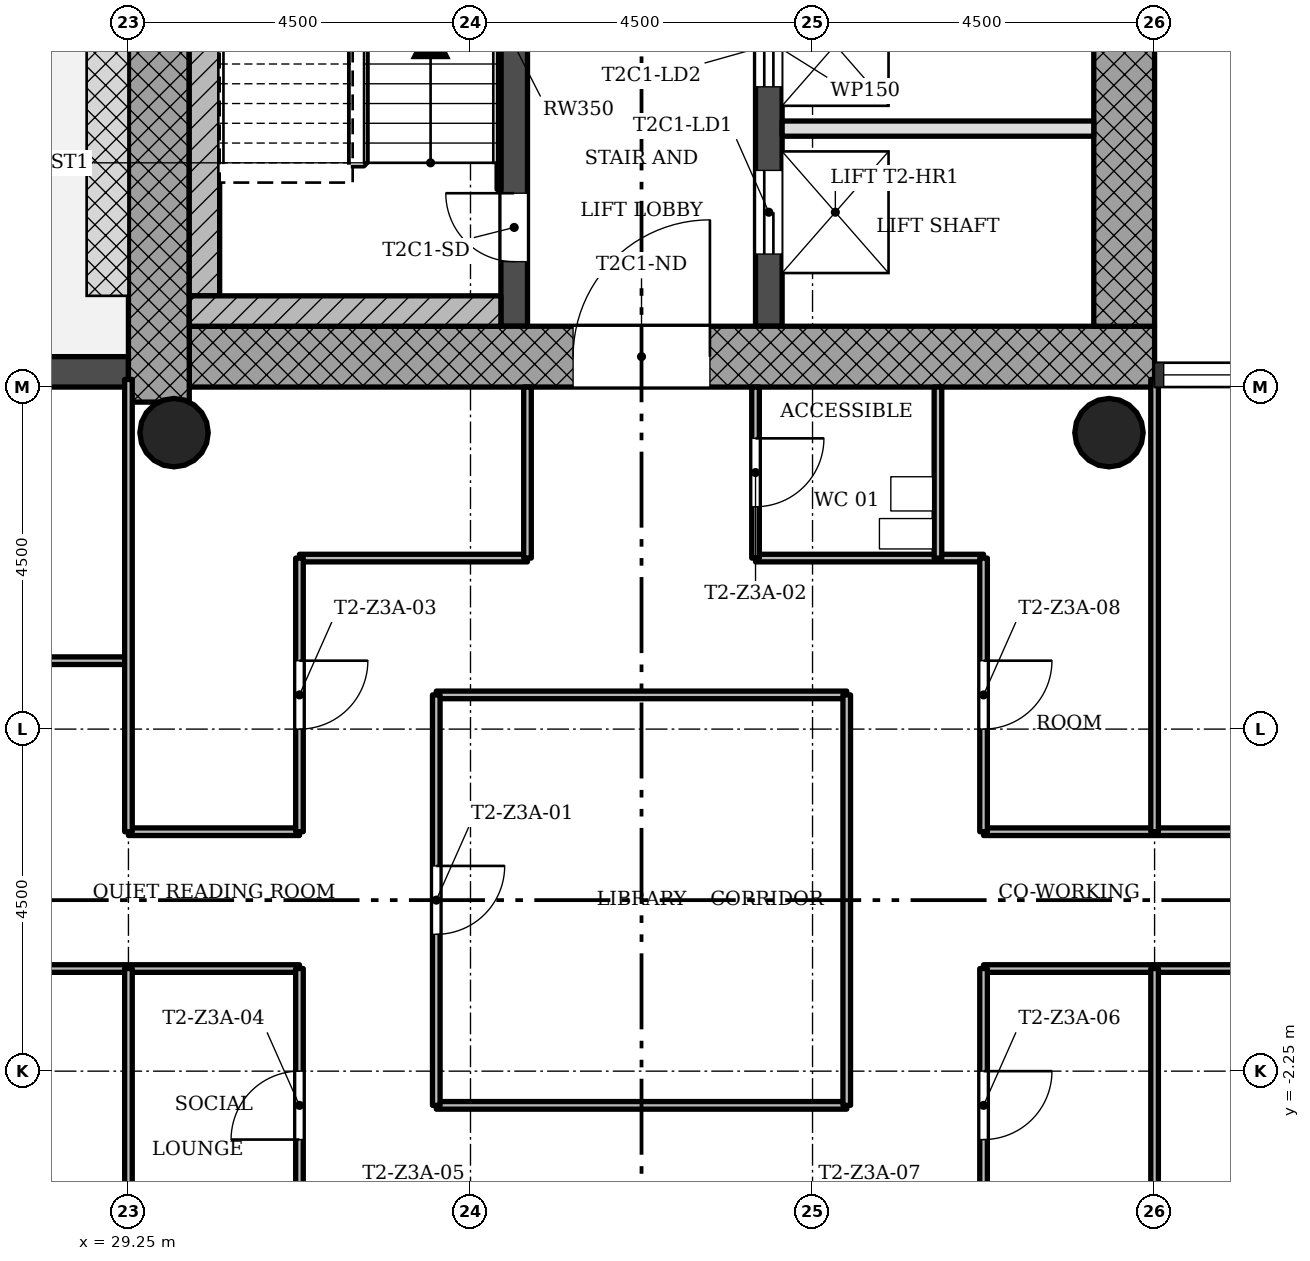
"""IFC4 building model, lengths in metres.
Left out: names, types, materials, properties, quantities, classifications, styles, units other than length and angle.
Written with IfcOpenShell. Run it as: python <this file> out.ifc"""

import sys

from ifc_helpers import new_model, si_unit, direction, frame, frame_2d, origin, origin_2d, place, context, subcontext, project, spatial, rectangle, hollow_circle, extrude, element, fill, save


model = new_model("IFC4")
c1 = context("Model", 3, precision=1e-05, world=origin(), true_north=direction((0.0, 1.0)))
c2 = subcontext(c1, "Body", "Model", "MODEL_VIEW")
j1 = project(units=[si_unit("LENGTHUNIT", "METRE"), si_unit("PLANEANGLEUNIT", "RADIAN")], contexts=[c1])
p1 = place(None, origin())
s1 = spatial("IfcSite", under=j1, at=p1, CompositionType="ELEMENT")
p2 = place(p1, origin())
s2 = spatial("IfcBuilding", under=s1, at=p2, CompositionType="ELEMENT")
p3 = place(p2, frame((0.0, 0.0, 140.5)))
s3 = spatial("IfcBuildingStorey", under=s2, at=p3, CompositionType="ELEMENT", Elevation=140.5)
p4 = place(p3, frame((30.05, 7.15, 0.0), z_axis=(0.0, 0.0, 1.0), x_axis=(1.0, 0.0, 0.0)))
e1 = element("IfcWall", 1, at=p4, inside=s3, PredefinedType="SHEAR", context=c2, shape_type="SweptSolid", body=[
    extrude(rectangle(XDim=12.7, YDim=0.8, at=frame_2d((6.35, 0.0))), origin(), (0.0, 0.0, 1.0), 3.4),
])
p5 = place(p4, frame((5.05, 0.0, 0.0)))
e2 = element("IfcOpeningElement", 2, at=p5, cuts=e1, PredefinedType="OPENING", context=c2, shape_type="SweptSolid", body=[
    extrude(rectangle(XDim=1.8, YDim=2.1, at=frame_2d((0.9, 1.05))), frame((0.0, 0.41, 0.0), z_axis=(0.0, -1.0, 0.0), x_axis=(1.0, 0.0, 0.0)), (0.0, 0.0, 1.0), 0.82),
])
p6 = place(p3, frame((42.35, 7.55, 0.0), z_axis=(0.0, 0.0, 1.0), x_axis=(0.0, 1.0, 0.0)))
e3 = element("IfcWall", 3, at=p6, inside=s3, PredefinedType="SHEAR", context=c2, shape_type="SweptSolid", body=[
    extrude(rectangle(XDim=8.2, YDim=0.8, at=frame_2d((4.1, 0.0))), origin(), (0.0, 0.0, 1.0), 3.4),
])
p7 = place(p3, frame((29.65, 15.348, 0.0), z_axis=(0.0, 0.0, 1.0), x_axis=(0.0, -1.0, 0.0)))
e4 = element("IfcWall", 4, at=p7, inside=s3, PredefinedType="SHEAR", context=c2, shape_type="SweptSolid", body=[
    extrude(rectangle(XDim=8.796, YDim=0.8, at=frame_2d((4.398, 0.0))), origin(), (0.0, 0.0, 1.0), 3.4),
])
p8 = place(p3, frame((34.325, 7.55, 0.0), z_axis=(0.0, 0.0, 1.0), x_axis=(0.0, 1.0, 0.0)))
e5 = element("IfcWall", 5, at=p8, inside=s3, PredefinedType="SHEAR", context=c2, shape_type="SweptSolid", body=[
    extrude(rectangle(XDim=7.4, YDim=0.35, at=frame_2d((3.7, 0.0))), origin(), (0.0, 0.0, 1.0), 3.4),
])
p9 = place(p8, frame((0.85, 0.0, 0.0)))
e6 = element("IfcOpeningElement", 6, at=p9, cuts=e5, PredefinedType="OPENING", context=c2, shape_type="SweptSolid", body=[
    extrude(rectangle(XDim=0.9, YDim=2.1, at=frame_2d((0.45, 1.05))), frame((0.0, 0.185, 0.0), z_axis=(0.0, -1.0, 0.0), x_axis=(1.0, 0.0, 0.0)), (0.0, 0.0, 1.0), 0.37),
])
p10 = place(p3, frame((37.675, 7.55, 0.0), z_axis=(0.0, 0.0, 1.0), x_axis=(0.0, 1.0, 0.0)))
e7 = element("IfcWall", 7, at=p10, inside=s3, PredefinedType="SHEAR", context=c2, shape_type="SweptSolid", body=[
    extrude(rectangle(XDim=7.4, YDim=0.35, at=frame_2d((3.7, 0.0))), origin(), (0.0, 0.0, 1.0), 3.4),
])
p11 = place(p10, frame((0.95, 0.0, 0.0)))
e8 = element("IfcOpeningElement", 8, at=p11, cuts=e7, PredefinedType="OPENING", context=c2, shape_type="SweptSolid", body=[
    extrude(rectangle(XDim=1.1, YDim=2.1, at=frame_2d((0.55, 1.05))), frame((0.0, 0.185, 0.0), z_axis=(0.0, -1.0, 0.0), x_axis=(1.0, 0.0, 0.0)), (0.0, 0.0, 1.0), 0.37),
])
p12 = place(p10, frame((3.15, 0.0, 0.0)))
e9 = element("IfcOpeningElement", 9, at=p12, cuts=e7, PredefinedType="OPENING", context=c2, shape_type="SweptSolid", body=[
    extrude(rectangle(XDim=1.1, YDim=2.1, at=frame_2d((0.55, 1.05))), frame((0.0, 0.185, 0.0), z_axis=(0.0, -1.0, 0.0), x_axis=(1.0, 0.0, 0.0)), (0.0, 0.0, 1.0), 0.37),
])
p13 = place(p10, frame((5.35, 0.0, 0.0)))
e10 = element("IfcOpeningElement", 10, at=p13, cuts=e7, PredefinedType="OPENING", context=c2, shape_type="SweptSolid", body=[
    extrude(rectangle(XDim=1.1, YDim=2.1, at=frame_2d((0.55, 1.05))), frame((0.0, 0.185, 0.0), z_axis=(0.0, -1.0, 0.0), x_axis=(1.0, 0.0, 0.0)), (0.0, 0.0, 1.0), 0.37),
])
for number, where, z_axis, x_axis in (
    (11, (42.15, 6.15, 0.0), (0.0, 0.0, 1.0), (1.0, 0.0, 0.0)),
    (12, (29.85, 6.15, 0.0), (0.0, 0.0, 1.0), (1.0, 0.0, 0.0)),
):
    element("IfcColumn", number, at=place(p3, frame(where, z_axis=z_axis, x_axis=x_axis)), inside=s3, PredefinedType="COLUMN", context=c2, shape_type="SweptSolid", body=[
        extrude(hollow_circle(Radius=0.45, WallThickness=0.032, at=origin_2d()), origin(), (0.0, 0.0, 1.0), 3.4),
    ])
p14 = place(p3, frame((29.25, 6.95, -0.02), z_axis=(0.0, 0.0, 1.0), x_axis=(-1.0, 0.0, 0.0)))
e13 = element("IfcWall", 13, at=p14, inside=s3, PredefinedType="STANDARD", context=c2, shape_type="SweptSolid", body=[
    extrude(rectangle(XDim=4.5, YDim=0.4, at=frame_2d((2.25, 0.0))), origin(), (0.0, 0.0, 1.0), 3.12),
])
p15 = place(p14, frame((1.35, 0.0, 0.02)))
e14 = element("IfcOpeningElement", 14, at=p15, cuts=e13, PredefinedType="OPENING", context=c2, shape_type="SweptSolid", body=[
    extrude(rectangle(XDim=1.8, YDim=2.1, at=frame_2d((0.9, 1.05))), frame((0.0, 0.21, 0.0), z_axis=(0.0, -1.0, 0.0), x_axis=(1.0, 0.0, 0.0)), (0.0, 0.0, 1.0), 0.42),
])
p16 = place(p3, frame((41.95, 10.15, 0.0), z_axis=(0.0, 0.0, 1.0), x_axis=(-1.0, 0.0, 0.0)))
e15 = element("IfcWall", 15, at=p16, inside=s3, PredefinedType="SOLIDWALL", context=c2, shape_type="SweptSolid", body=[
    extrude(rectangle(XDim=4.1, YDim=0.2, at=frame_2d((2.05, 0.0))), origin(), (0.0, 0.0, 1.0), 3.0),
])
p17 = place(p3, frame((38.7, -2.7, 0.0), z_axis=(0.0, 0.0, 1.0), x_axis=(-1.0, 0.0, 0.0)))
e16 = element("IfcWall", 16, at=p17, inside=s3, PredefinedType="PARTITIONING", context=c2, shape_type="SweptSolid", body=[
    extrude(rectangle(XDim=5.4, YDim=0.1, at=frame_2d((2.7, 0.0))), origin(), (0.0, 0.0, 1.0), 3.0),
])
p18 = place(p3, frame((47.25, -0.9, 0.0), z_axis=(0.0, 0.0, 1.0), x_axis=(-1.0, 0.0, 0.0)))
e17 = element("IfcWall", 17, at=p18, inside=s3, PredefinedType="PARTITIONING", context=c2, shape_type="SweptSolid", body=[
    extrude(rectangle(XDim=6.75, YDim=0.1, at=frame_2d((3.375, 0.0))), origin(), (0.0, 0.0, 1.0), 3.0),
])
p19 = place(p18, frame((1.8, 0.0, 0.0)))
e18 = element("IfcOpeningElement", 18, at=p19, cuts=e17, PredefinedType="OPENING", context=c2, shape_type="SweptSolid", body=[
    extrude(rectangle(XDim=0.9, YDim=2.1, at=frame_2d((0.45, 1.05))), frame((0.0, 0.06, 0.0), z_axis=(0.0, -1.0, 0.0), x_axis=(1.0, 0.0, 0.0)), (0.0, 0.0, 1.0), 0.12),
])
p20 = place(p3, frame((31.5, -0.9, 0.0), z_axis=(0.0, 0.0, 1.0), x_axis=(-1.0, 0.0, 0.0)))
e19 = element("IfcWall", 19, at=p20, inside=s3, PredefinedType="PARTITIONING", context=c2, shape_type="SweptSolid", body=[
    extrude(rectangle(XDim=4.05, YDim=0.1, at=frame_2d((2.025, 0.0))), origin(), (0.0, 0.0, 1.0), 3.0),
])
p21 = place(p3, frame((47.25, 0.9, 0.0), z_axis=(0.0, 0.0, 1.0), x_axis=(-1.0, 0.0, 0.0)))
e20 = element("IfcWall", 20, at=p21, inside=s3, PredefinedType="PARTITIONING", context=c2, shape_type="SweptSolid", body=[
    extrude(rectangle(XDim=6.75, YDim=0.1, at=frame_2d((3.375, 0.0))), origin(), (0.0, 0.0, 1.0), 3.0),
])
p22 = place(p21, frame((1.8, 0.0, 0.0)))
e21 = element("IfcOpeningElement", 21, at=p22, cuts=e20, PredefinedType="OPENING", context=c2, shape_type="SweptSolid", body=[
    extrude(rectangle(XDim=0.9, YDim=2.1, at=frame_2d((0.45, 1.05))), frame((0.0, 0.06, 0.0), z_axis=(0.0, -1.0, 0.0), x_axis=(1.0, 0.0, 0.0)), (0.0, 0.0, 1.0), 0.12),
])
p23 = place(p3, frame((31.5, 0.9, 0.0), z_axis=(0.0, 0.0, 1.0), x_axis=(-1.0, 0.0, 0.0)))
e22 = element("IfcWall", 22, at=p23, inside=s3, PredefinedType="PARTITIONING", context=c2, shape_type="SweptSolid", body=[
    extrude(rectangle(XDim=2.25, YDim=0.1, at=frame_2d((1.125, 0.0))), origin(), (0.0, 0.0, 1.0), 3.0),
])
p24 = place(p3, frame((38.7, 2.7, 0.0), z_axis=(0.0, 0.0, 1.0), x_axis=(-1.0, 0.0, 0.0)))
e23 = element("IfcWall", 23, at=p24, inside=s3, PredefinedType="PARTITIONING", context=c2, shape_type="SweptSolid", body=[
    extrude(rectangle(XDim=5.4, YDim=0.1, at=frame_2d((2.7, 0.0))), origin(), (0.0, 0.0, 1.0), 3.0),
])
p25 = place(p3, frame((29.25, 3.15, 0.0), z_axis=(0.0, 0.0, 1.0), x_axis=(-1.0, 0.0, 0.0)))
e24 = element("IfcWall", 24, at=p25, inside=s3, PredefinedType="PARTITIONING", context=c2, shape_type="SweptSolid", body=[
    extrude(rectangle(XDim=9.0, YDim=0.1, at=frame_2d((4.5, 0.0))), origin(), (0.0, 0.0, 1.0), 3.0),
])
p26 = place(p25, frame((2.55, 0.0, 0.0)))
e25 = element("IfcOpeningElement", 25, at=p26, cuts=e24, PredefinedType="OPENING", context=c2, shape_type="SweptSolid", body=[
    extrude(rectangle(XDim=0.9, YDim=2.1, at=frame_2d((0.45, 1.05))), frame((0.0, 0.06, 0.0), z_axis=(0.0, -1.0, 0.0), x_axis=(1.0, 0.0, 0.0)), (0.0, 0.0, 1.0), 0.12),
])
for number, where, z_axis, x_axis in (
    (26, (40.5, 4.5, 0.0), (0.0, 0.0, 1.0), (-1.0, 0.0, 0.0)),
    (27, (34.5, 4.5, 0.0), (0.0, 0.0, 1.0), (-1.0, 0.0, 0.0)),
):
    element("IfcWall", number, at=place(p3, frame(where, z_axis=z_axis, x_axis=x_axis)), inside=s3, PredefinedType="PARTITIONING", context=c2, shape_type="SweptSolid", body=[
        extrude(rectangle(XDim=3.0, YDim=0.1, at=frame_2d((1.5, 0.0))), origin(), (0.0, 0.0, 1.0), 3.0),
    ])
for number, where, z_axis, x_axis in (
    (28, (42.75, -6.85, 0.0), (0.0, 0.0, 1.0), (0.0, 1.0, 0.0)),
    (29, (42.75, 0.9, 0.0), (0.0, 0.0, 1.0), (0.0, 1.0, 0.0)),
):
    element("IfcWall", number, at=place(p3, frame(where, z_axis=z_axis, x_axis=x_axis)), inside=s3, PredefinedType="PARTITIONING", context=c2, shape_type="SweptSolid", body=[
        extrude(rectangle(XDim=5.95, YDim=0.1, at=frame_2d((2.975, 0.0))), origin(), (0.0, 0.0, 1.0), 3.0),
    ])
p27 = place(p3, frame((40.5, -6.75, 0.0), z_axis=(0.0, 0.0, 1.0), x_axis=(0.0, 1.0, 0.0)))
e30 = element("IfcWall", 30, at=p27, inside=s3, PredefinedType="PARTITIONING", context=c2, shape_type="SweptSolid", body=[
    extrude(rectangle(XDim=5.85, YDim=0.1, at=frame_2d((2.925, 0.0))), origin(), (0.0, 0.0, 1.0), 3.0),
])
p28 = place(p27, frame((3.6, 0.0, 0.0)))
e31 = element("IfcOpeningElement", 31, at=p28, cuts=e30, PredefinedType="OPENING", context=c2, shape_type="SweptSolid", body=[
    extrude(rectangle(XDim=0.9, YDim=2.1, at=frame_2d((0.45, 1.05))), frame((0.0, 0.06, 0.0), z_axis=(0.0, -1.0, 0.0), x_axis=(1.0, 0.0, 0.0)), (0.0, 0.0, 1.0), 0.12),
])
p29 = place(p3, frame((40.5, 0.9, 0.0), z_axis=(0.0, 0.0, 1.0), x_axis=(0.0, 1.0, 0.0)))
e32 = element("IfcWall", 32, at=p29, inside=s3, PredefinedType="PARTITIONING", context=c2, shape_type="SweptSolid", body=[
    extrude(rectangle(XDim=3.6, YDim=0.1, at=frame_2d((1.8, 0.0))), origin(), (0.0, 0.0, 1.0), 3.0),
])
p30 = place(p29, frame((1.35, 0.0, 0.0)))
e33 = element("IfcOpeningElement", 33, at=p30, cuts=e32, PredefinedType="OPENING", context=c2, shape_type="SweptSolid", body=[
    extrude(rectangle(XDim=0.9, YDim=2.1, at=frame_2d((0.45, 1.05))), frame((0.0, 0.06, 0.0), z_axis=(0.0, -1.0, 0.0), x_axis=(1.0, 0.0, 0.0)), (0.0, 0.0, 1.0), 0.12),
])
p31 = place(p3, frame((39.9, 4.5, 0.0), z_axis=(0.0, 0.0, 1.0), x_axis=(0.0, 1.0, 0.0)))
e34 = element("IfcWall", 34, at=p31, inside=s3, PredefinedType="PARTITIONING", context=c2, shape_type="SweptSolid", body=[
    extrude(rectangle(XDim=2.25, YDim=0.1, at=frame_2d((1.125, 0.0))), origin(), (0.0, 0.0, 1.0), 3.0),
])
p32 = place(p3, frame((38.7, -2.7, 0.0), z_axis=(0.0, 0.0, 1.0), x_axis=(0.0, 1.0, 0.0)))
e35 = element("IfcWall", 35, at=p32, inside=s3, PredefinedType="PARTITIONING", context=c2, shape_type="SweptSolid", body=[
    extrude(rectangle(XDim=5.4, YDim=0.1, at=frame_2d((2.7, 0.0))), origin(), (0.0, 0.0, 1.0), 3.0),
])
p33 = place(p3, frame((37.5, 4.5, 0.0), z_axis=(0.0, 0.0, 1.0), x_axis=(0.0, 1.0, 0.0)))
e36 = element("IfcWall", 36, at=p33, inside=s3, PredefinedType="PARTITIONING", context=c2, shape_type="SweptSolid", body=[
    extrude(rectangle(XDim=2.25, YDim=0.1, at=frame_2d((1.125, 0.0))), origin(), (0.0, 0.0, 1.0), 3.0),
])
p34 = place(p33, frame((0.675, 0.0, 0.0)))
e37 = element("IfcOpeningElement", 37, at=p34, cuts=e36, PredefinedType="OPENING", context=c2, shape_type="SweptSolid", body=[
    extrude(rectangle(XDim=0.9, YDim=2.1, at=frame_2d((0.45, 1.05))), frame((0.0, 0.06, 0.0), z_axis=(0.0, -1.0, 0.0), x_axis=(1.0, 0.0, 0.0)), (0.0, 0.0, 1.0), 0.12),
])
p35 = place(p3, frame((34.5, 4.5, 0.0), z_axis=(0.0, 0.0, 1.0), x_axis=(0.0, 1.0, 0.0)))
e38 = element("IfcWall", 38, at=p35, inside=s3, PredefinedType="PARTITIONING", context=c2, shape_type="SweptSolid", body=[
    extrude(rectangle(XDim=2.25, YDim=0.1, at=frame_2d((1.125, 0.0))), origin(), (0.0, 0.0, 1.0), 3.0),
])
p36 = place(p3, frame((33.3, -2.7, 0.0), z_axis=(0.0, 0.0, 1.0), x_axis=(0.0, 1.0, 0.0)))
e39 = element("IfcWall", 39, at=p36, inside=s3, PredefinedType="PARTITIONING", context=c2, shape_type="SweptSolid", body=[
    extrude(rectangle(XDim=5.4, YDim=0.1, at=frame_2d((2.7, 0.0))), origin(), (0.0, 0.0, 1.0), 3.0),
])
p37 = place(p36, frame((2.25, 0.0, 0.0)))
e40 = element("IfcOpeningElement", 40, at=p37, cuts=e39, PredefinedType="OPENING", context=c2, shape_type="SweptSolid", body=[
    extrude(rectangle(XDim=0.9, YDim=2.1, at=frame_2d((0.45, 1.05))), frame((0.0, 0.06, 0.0), z_axis=(0.0, -1.0, 0.0), x_axis=(1.0, 0.0, 0.0)), (0.0, 0.0, 1.0), 0.12),
])
p38 = place(p3, frame((31.5, -4.5, 0.0), z_axis=(0.0, 0.0, 1.0), x_axis=(0.0, 1.0, 0.0)))
e41 = element("IfcWall", 41, at=p38, inside=s3, PredefinedType="PARTITIONING", context=c2, shape_type="SweptSolid", body=[
    extrude(rectangle(XDim=3.6, YDim=0.1, at=frame_2d((1.8, 0.0))), origin(), (0.0, 0.0, 1.0), 3.0),
])
p39 = place(p38, frame((1.35, 0.0, 0.0)))
e42 = element("IfcOpeningElement", 42, at=p39, cuts=e41, PredefinedType="OPENING", context=c2, shape_type="SweptSolid", body=[
    extrude(rectangle(XDim=0.9, YDim=2.1, at=frame_2d((0.45, 1.05))), frame((0.0, 0.06, 0.0), z_axis=(0.0, -1.0, 0.0), x_axis=(1.0, 0.0, 0.0)), (0.0, 0.0, 1.0), 0.12),
])
p40 = place(p3, frame((31.5, 0.9, 0.0), z_axis=(0.0, 0.0, 1.0), x_axis=(0.0, 1.0, 0.0)))
e43 = element("IfcWall", 43, at=p40, inside=s3, PredefinedType="PARTITIONING", context=c2, shape_type="SweptSolid", body=[
    extrude(rectangle(XDim=3.6, YDim=0.1, at=frame_2d((1.8, 0.0))), origin(), (0.0, 0.0, 1.0), 3.0),
])
p41 = place(p40, frame((1.35, 0.0, 0.0)))
e44 = element("IfcOpeningElement", 44, at=p41, cuts=e43, PredefinedType="OPENING", context=c2, shape_type="SweptSolid", body=[
    extrude(rectangle(XDim=0.9, YDim=2.1, at=frame_2d((0.45, 1.05))), frame((0.0, 0.06, 0.0), z_axis=(0.0, -1.0, 0.0), x_axis=(1.0, 0.0, 0.0)), (0.0, 0.0, 1.0), 0.12),
])
for number, where, z_axis, x_axis in (
    (45, (29.25, -6.85, 0.0), (0.0, 0.0, 1.0), (0.0, 1.0, 0.0)),
    (46, (29.25, 0.9, 0.0), (0.0, 0.0, 1.0), (0.0, 1.0, 0.0)),
):
    element("IfcWall", number, at=place(p3, frame(where, z_axis=z_axis, x_axis=x_axis)), inside=s3, PredefinedType="PARTITIONING", context=c2, shape_type="SweptSolid", body=[
        extrude(rectangle(XDim=5.95, YDim=0.1, at=frame_2d((2.975, 0.0))), origin(), (0.0, 0.0, 1.0), 3.0),
    ])
p42 = place(p3, frame((30.25, 7.95, 0.0), z_axis=(0.0, 0.0, 1.0), x_axis=(0.0, 1.0, 0.0)))
e47 = element("IfcWall", 47, at=p42, inside=s3, PredefinedType="SHEAR", context=c2, shape_type="SweptSolid", body=[
    extrude(rectangle(XDim=6.6, YDim=0.4, at=frame_2d((3.3, 0.0))), origin(), (0.0, 0.0, 1.0), 3.4),
])
p43 = place(p3, frame((34.15, 7.75, 0.0), z_axis=(0.0, 0.0, 1.0), x_axis=(-1.0, 0.0, 0.0)))
e48 = element("IfcWall", 48, at=p43, inside=s3, PredefinedType="SHEAR", context=c2, shape_type="SweptSolid", body=[
    extrude(rectangle(XDim=4.1, YDim=0.4, at=frame_2d((2.05, 0.0))), origin(), (0.0, 0.0, 1.0), 3.4),
])
p44 = place(p3, frame((34.125, 9.35, 0.0), z_axis=(0.0, 0.0, 1.0), x_axis=(0.0, 1.0, 0.0)))
e49 = element("IfcWall", 49, at=p44, inside=s3, PredefinedType="SHEAR", context=c2, shape_type="SweptSolid", body=[
    extrude(rectangle(XDim=5.2, YDim=0.05, at=frame_2d((2.6, 0.0))), origin(), (0.0, 0.0, 1.0), 3.4),
])
p45 = place(p37, origin())
e50 = element("IfcDoor", 50, at=p45, inside=s3, OperationType="SINGLE_SWING_RIGHT", PredefinedType="DOOR", context=c2, shape_type="SweptSolid", body=[
    extrude(rectangle(XDim=0.9, YDim=2.1, at=frame_2d((0.45, 1.05))), frame((0.0, 0.025, 0.0), z_axis=(0.0, -1.0, 0.0), x_axis=(1.0, 0.0, 0.0)), (0.0, 0.0, 1.0), 0.05),
])
fill(e40, e50)
p46 = place(p34, origin())
e51 = element("IfcDoor", 51, at=p46, inside=s3, OperationType="SINGLE_SWING_RIGHT", PredefinedType="DOOR", context=c2, shape_type="SweptSolid", body=[
    extrude(rectangle(XDim=0.9, YDim=2.1, at=frame_2d((0.45, 1.05))), frame((0.0, 0.025, 0.0), z_axis=(0.0, -1.0, 0.0), x_axis=(1.0, 0.0, 0.0)), (0.0, 0.0, 1.0), 0.05),
])
fill(e37, e51)
p47 = place(p41, origin())
e52 = element("IfcDoor", 52, at=p47, inside=s3, OperationType="SINGLE_SWING_RIGHT", PredefinedType="DOOR", context=c2, shape_type="SweptSolid", body=[
    extrude(rectangle(XDim=0.9, YDim=2.1, at=frame_2d((0.45, 1.05))), frame((0.0, 0.025, 0.0), z_axis=(0.0, -1.0, 0.0), x_axis=(1.0, 0.0, 0.0)), (0.0, 0.0, 1.0), 0.05),
])
fill(e44, e52)
p48 = place(p39, origin())
e53 = element("IfcDoor", 53, at=p48, inside=s3, OperationType="SINGLE_SWING_RIGHT", PredefinedType="DOOR", context=c2, shape_type="SweptSolid", body=[
    extrude(rectangle(XDim=0.9, YDim=2.1, at=frame_2d((0.45, 1.05))), frame((0.0, 0.025, 0.0), z_axis=(0.0, -1.0, 0.0), x_axis=(1.0, 0.0, 0.0)), (0.0, 0.0, 1.0), 0.05),
])
fill(e42, e53)
p49 = place(p28, origin())
e54 = element("IfcDoor", 54, at=p49, inside=s3, OperationType="SINGLE_SWING_RIGHT", PredefinedType="DOOR", context=c2, shape_type="SweptSolid", body=[
    extrude(rectangle(XDim=0.9, YDim=2.1, at=frame_2d((0.45, 1.05))), frame((0.0, 0.025, 0.0), z_axis=(0.0, -1.0, 0.0), x_axis=(1.0, 0.0, 0.0)), (0.0, 0.0, 1.0), 0.05),
])
fill(e31, e54)
p50 = place(p30, origin())
e55 = element("IfcDoor", 55, at=p50, inside=s3, OperationType="SINGLE_SWING_RIGHT", PredefinedType="DOOR", context=c2, shape_type="SweptSolid", body=[
    extrude(rectangle(XDim=0.9, YDim=2.1, at=frame_2d((0.45, 1.05))), frame((0.0, 0.025, 0.0), z_axis=(0.0, -1.0, 0.0), x_axis=(1.0, 0.0, 0.0)), (0.0, 0.0, 1.0), 0.05),
])
fill(e33, e55)
p51 = place(p9, origin())
e56 = element("IfcDoor", 56, at=p51, inside=s3, OperationType="SINGLE_SWING_LEFT", PredefinedType="DOOR", context=c2, shape_type="SweptSolid", body=[
    extrude(rectangle(XDim=0.9, YDim=2.1, at=frame_2d((0.45, 1.05))), frame((0.0, 0.025, 0.0), z_axis=(0.0, -1.0, 0.0), x_axis=(1.0, 0.0, 0.0)), (0.0, 0.0, 1.0), 0.05),
])
fill(e6, e56)
p52 = place(p11, origin())
e57 = element("IfcDoor", 57, at=p52, inside=s3, OperationType="SLIDING_TO_LEFT", PredefinedType="DOOR", context=c2, shape_type="SweptSolid", body=[
    extrude(rectangle(XDim=1.1, YDim=2.1, at=frame_2d((0.55, 1.05))), frame((0.0, 0.025, 0.0), z_axis=(0.0, -1.0, 0.0), x_axis=(1.0, 0.0, 0.0)), (0.0, 0.0, 1.0), 0.05),
])
fill(e8, e57)
p53 = place(p12, origin())
e58 = element("IfcDoor", 58, at=p53, inside=s3, OperationType="SLIDING_TO_LEFT", PredefinedType="DOOR", context=c2, shape_type="SweptSolid", body=[
    extrude(rectangle(XDim=1.1, YDim=2.1, at=frame_2d((0.55, 1.05))), frame((0.0, 0.025, 0.0), z_axis=(0.0, -1.0, 0.0), x_axis=(1.0, 0.0, 0.0)), (0.0, 0.0, 1.0), 0.05),
])
fill(e9, e58)
p54 = place(p5, origin())
e59 = element("IfcDoor", 59, at=p54, inside=s3, OperationType="SINGLE_SWING_LEFT", PredefinedType="DOOR", context=c2, shape_type="SweptSolid", body=[
    extrude(rectangle(XDim=1.8, YDim=2.1, at=frame_2d((0.9, 1.05))), frame((0.0, 0.025, 0.0), z_axis=(0.0, -1.0, 0.0), x_axis=(1.0, 0.0, 0.0)), (0.0, 0.0, 1.0), 0.05),
])
fill(e2, e59)
save(model, sys.argv[1])
